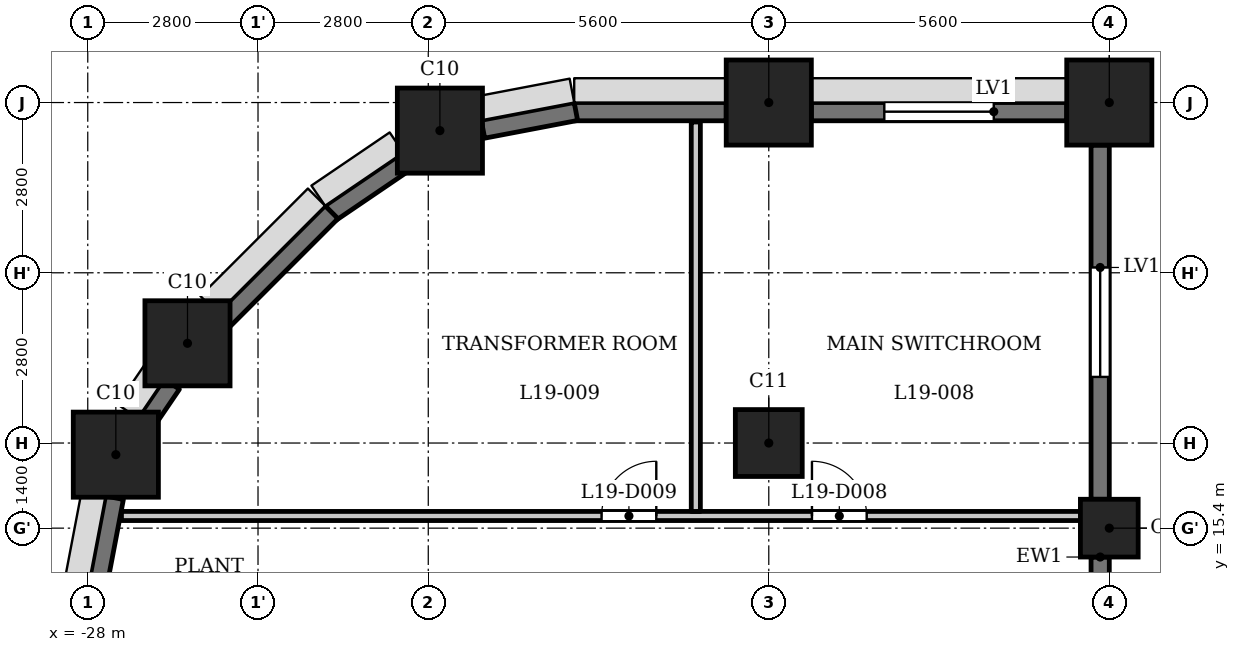
"""IFC4 building model, lengths in metres.
Left out: names, types, materials, properties, quantities, classifications, styles, units other than length and angle.
Written with IfcOpenShell. Run it as: python <this file> out.ifc"""

import sys

from ifc_helpers import new_model, si_unit, direction, frame, frame_2d, origin, origin_2d, place, context, subcontext, project, spatial, rectangle, extrude, element, fill, save


model = new_model("IFC4")
c1 = context("Model", 3, precision=1e-05, world=origin(), true_north=direction((0.0, 1.0)))
c2 = subcontext(c1, "Body", "Model", "MODEL_VIEW")
j1 = project(units=[si_unit("LENGTHUNIT", "METRE"), si_unit("PLANEANGLEUNIT", "RADIAN")], contexts=[c1])
p1 = place(None, origin())
s1 = spatial("IfcSite", under=j1, at=p1, CompositionType="ELEMENT")
p2 = place(p1, origin())
s2 = spatial("IfcBuilding", under=s1, at=p2, CompositionType="ELEMENT")
p3 = place(p2, frame((0.0, 0.0, 77.9)))
s3 = spatial("IfcBuildingStorey", under=s2, at=p3, CompositionType="ELEMENT", Elevation=77.9)
for number, where, z_axis, x_axis in (
    (1, (-11.2, 22.4, 0.0), (0.0, 0.0, 1.0), (1.0, 0.0, 0.0)),
    (2, (-16.8, 22.4, 0.0), (0.0, 0.0, 1.0), (1.0, 0.0, 0.0)),
    (3, (-22.209, 21.938, 0.0), (0.0, 0.0, 1.0), (1.0, 0.0, 0.0)),
    (4, (-26.36, 18.44, 0.0), (0.0, 0.0, 1.0), (1.0, 0.0, 0.0)),
    (5, (-27.538, 16.609, 0.0), (0.0, 0.0, 1.0), (1.0, 0.0, 0.0)),
):
    element("IfcColumn", number, at=place(p3, frame(where, z_axis=z_axis, x_axis=x_axis)), inside=s3, PredefinedType="COLUMN", context=c2, shape_type="SweptSolid", body=[
        extrude(rectangle(XDim=1.4, YDim=1.4, at=origin_2d()), origin(), (0.0, 0.0, 1.0), 5.4),
    ])
p4 = place(p3, frame((-16.8, 16.8, 0.0), z_axis=(0.0, 0.0, 1.0), x_axis=(1.0, 0.0, 0.0)))
e6 = element("IfcColumn", 6, at=p4, inside=s3, PredefinedType="COLUMN", context=c2, shape_type="SweptSolid", body=[
    extrude(rectangle(XDim=1.1, YDim=1.1, at=origin_2d()), origin(), (0.0, 0.0, 1.0), 5.4),
])
p5 = place(p3, frame((-11.2, 15.4, 0.0), z_axis=(0.0, 0.0, 1.0), x_axis=(1.0, 0.0, 0.0)))
e7 = element("IfcColumn", 7, at=p5, inside=s3, PredefinedType="COLUMN", context=c2, shape_type="SweptSolid", body=[
    extrude(rectangle(XDim=0.95, YDim=0.95, at=origin_2d()), origin(), (0.0, 0.0, 1.0), 5.4),
])
p6 = place(p3, frame((-11.35, 8.95, 0.0), z_axis=(0.0, 0.0, 1.0), x_axis=(0.0, 1.0, 0.0)))
e8 = element("IfcWall", 8, at=p6, inside=s3, PredefinedType="SOLIDWALL", context=c2, shape_type="SweptSolid", body=[
    extrude(rectangle(XDim=5.975, YDim=0.3, at=frame_2d((2.988, 0.0))), origin(), (0.0, 0.0, 1.0), 5.1),
])
p7 = place(p6, frame((1.188, 0.0, 0.9)))
e9 = element("IfcOpeningElement", 9, at=p7, cuts=e8, PredefinedType="OPENING", context=c2, shape_type="SweptSolid", body=[
    extrude(rectangle(XDim=1.8, YDim=1.5, at=frame_2d((0.9, 0.75))), frame((0.0, 0.16, 0.0), z_axis=(0.0, -1.0, 0.0), x_axis=(1.0, 0.0, 0.0)), (0.0, 0.0, 1.0), 0.32),
])
p8 = place(p3, frame((-11.35, 15.875, 0.0), z_axis=(0.0, 0.0, 1.0), x_axis=(0.0, 1.0, 0.0)))
e10 = element("IfcWall", 10, at=p8, inside=s3, PredefinedType="SOLIDWALL", context=c2, shape_type="SweptSolid", body=[
    extrude(rectangle(XDim=5.825, YDim=0.3, at=frame_2d((2.913, 0.0))), origin(), (0.0, 0.0, 1.0), 5.1),
])
p9 = place(p8, frame((2.012, 0.0, 0.9)))
e11 = element("IfcOpeningElement", 11, at=p9, cuts=e10, PredefinedType="OPENING", context=c2, shape_type="SweptSolid", body=[
    extrude(rectangle(XDim=1.8, YDim=1.5, at=frame_2d((0.9, 0.75))), frame((0.0, 0.16, 0.0), z_axis=(0.0, -1.0, 0.0), x_axis=(1.0, 0.0, 0.0)), (0.0, 0.0, 1.0), 0.32),
])
p10 = place(p3, frame((-11.9, 22.25, 0.0), z_axis=(0.0, 0.0, 1.0), x_axis=(-1.0, 0.0, 0.0)))
e12 = element("IfcWall", 12, at=p10, inside=s3, PredefinedType="SOLIDWALL", context=c2, shape_type="SweptSolid", body=[
    extrude(rectangle(XDim=4.2, YDim=0.3, at=frame_2d((2.1, 0.0))), origin(), (0.0, 0.0, 1.0), 4.25),
])
p11 = place(p10, frame((1.2, 0.0, 0.9)))
e13 = element("IfcOpeningElement", 13, at=p11, cuts=e12, PredefinedType="OPENING", context=c2, shape_type="SweptSolid", body=[
    extrude(rectangle(XDim=1.8, YDim=1.5, at=frame_2d((0.9, 0.75))), frame((0.0, 0.16, 0.0), z_axis=(0.0, -1.0, 0.0), x_axis=(1.0, 0.0, 0.0)), (0.0, 0.0, 1.0), 0.32),
])
p12 = place(p3, frame((-17.5, 22.25, 0.0), z_axis=(0.0, 0.0, 1.0), x_axis=(-1.0, 0.0, 0.0)))
e14 = element("IfcWall", 14, at=p12, inside=s3, PredefinedType="SOLIDWALL", context=c2, shape_type="SweptSolid", body=[
    extrude(rectangle(XDim=2.5, YDim=0.3, at=frame_2d((1.25, 0.0))), origin(), (0.0, 0.0, 1.0), 4.25),
])
p13 = place(p3, frame((-19.972, 22.253, 0.0), z_axis=(0.0, 0.0, 1.0), x_axis=(-0.982297345734, -0.187328386968, 0.0)))
e15 = element("IfcWall", 15, at=p13, inside=s3, PredefinedType="SOLIDWALL", context=c2, shape_type="SweptSolid", body=[
    extrude(rectangle(XDim=1.556, YDim=0.3, at=frame_2d((0.778, 0.0))), origin(), (0.0, 0.0, 1.0), 4.25),
])
p14 = place(p3, frame((-22.726, 21.454, 0.0), z_axis=(0.0, 0.0, 1.0), x_axis=(-0.827019875346, -0.562172683241, 0.0)))
e16 = element("IfcWall", 16, at=p14, inside=s3, PredefinedType="SOLIDWALL", context=c2, shape_type="SweptSolid", body=[
    extrude(rectangle(XDim=1.556, YDim=0.3, at=frame_2d((0.778, 0.0))), origin(), (0.0, 0.0, 1.0), 4.25),
])
p15 = place(p3, frame((-23.991, 20.597, 0.0), z_axis=(0.0, 0.0, 1.0), x_axis=(-0.707106781187, -0.707106781187, 0.0)))
e17 = element("IfcWall", 17, at=p15, inside=s3, PredefinedType="SOLIDWALL", context=c2, shape_type="SweptSolid", body=[
    extrude(rectangle(XDim=2.5, YDim=0.3, at=frame_2d((1.25, 0.0))), origin(), (0.0, 0.0, 1.0), 4.25),
])
p16 = place(p3, frame((-26.617, 17.769, 0.0), z_axis=(0.0, 0.0, 1.0), x_axis=(-0.562000651531, -0.827136788977, 0.0)))
e18 = element("IfcWall", 18, at=p16, inside=s3, PredefinedType="SOLIDWALL", context=c2, shape_type="SweptSolid", body=[
    extrude(rectangle(XDim=0.777, YDim=0.3, at=frame_2d((0.389, 0.0))), origin(), (0.0, 0.0, 1.0), 5.1),
])
p17 = place(p3, frame((-27.561, 15.9, 0.0), z_axis=(0.0, 0.0, 1.0), x_axis=(-0.187328386968, -0.982297345734, 0.0)))
e19 = element("IfcWall", 19, at=p17, inside=s3, PredefinedType="SOLIDWALL", context=c2, shape_type="SweptSolid", body=[
    extrude(rectangle(XDim=1.556, YDim=0.3, at=frame_2d((0.778, 0.0))), origin(), (0.0, 0.0, 1.0), 4.25),
])
p18 = place(p3, frame((-27.446, 15.6, 0.0), z_axis=(0.0, 0.0, 1.0), x_axis=(1.0, 0.0, 0.0)))
e20 = element("IfcWall", 20, at=p18, inside=s3, PredefinedType="PARTITIONING", context=c2, shape_type="SweptSolid", body=[
    extrude(rectangle(XDim=16.156, YDim=0.15, at=frame_2d((8.078, 0.0))), origin(), (0.0, 0.0, 1.0), 5.1),
])
p19 = place(p18, frame((11.356, 0.0, 0.0)))
e21 = element("IfcOpeningElement", 21, at=p19, cuts=e20, PredefinedType="OPENING", context=c2, shape_type="SweptSolid", body=[
    extrude(rectangle(XDim=0.9, YDim=2.1, at=frame_2d((0.45, 1.05))), frame((0.0, 0.085, 0.0), z_axis=(0.0, -1.0, 0.0), x_axis=(1.0, 0.0, 0.0)), (0.0, 0.0, 1.0), 0.17),
])
p20 = place(p18, frame((7.896, 0.0, 0.0)))
e22 = element("IfcOpeningElement", 22, at=p20, cuts=e20, PredefinedType="OPENING", context=c2, shape_type="SweptSolid", body=[
    extrude(rectangle(XDim=0.9, YDim=2.1, at=frame_2d((0.45, 1.05))), frame((0.0, 0.085, 0.0), z_axis=(0.0, -1.0, 0.0), x_axis=(1.0, 0.0, 0.0)), (0.0, 0.0, 1.0), 0.17),
])
p21 = place(p3, frame((-18.0, 15.675, 0.0), z_axis=(0.0, 0.0, 1.0), x_axis=(0.0, 1.0, 0.0)))
e23 = element("IfcWall", 23, at=p21, inside=s3, PredefinedType="PARTITIONING", context=c2, shape_type="SweptSolid", body=[
    extrude(rectangle(XDim=6.405, YDim=0.15, at=frame_2d((3.203, 0.0))), origin(), (0.0, 0.0, 1.0), 5.1),
])
p22 = place(p19, origin())
e24 = element("IfcDoor", 24, at=p22, inside=s3, OperationType="SINGLE_SWING_RIGHT", PredefinedType="DOOR", context=c2, shape_type="SweptSolid", body=[
    extrude(rectangle(XDim=0.9, YDim=2.1, at=frame_2d((0.45, 1.05))), frame((0.0, 0.025, 0.0), z_axis=(0.0, -1.0, 0.0), x_axis=(1.0, 0.0, 0.0)), (0.0, 0.0, 1.0), 0.05),
])
fill(e21, e24)
p23 = place(p20, origin())
e25 = element("IfcDoor", 25, at=p23, inside=s3, OperationType="SINGLE_SWING_LEFT", PredefinedType="DOOR", context=c2, shape_type="SweptSolid", body=[
    extrude(rectangle(XDim=0.9, YDim=2.1, at=frame_2d((0.45, 1.05))), frame((0.0, 0.025, 0.0), z_axis=(0.0, -1.0, 0.0), x_axis=(1.0, 0.0, 0.0)), (0.0, 0.0, 1.0), 0.05),
])
fill(e22, e25)
p24 = place(p9, origin())
e26 = element("IfcWindow", 26, at=p24, inside=s3, PartitioningType="SINGLE_PANEL", PredefinedType="WINDOW", context=c2, shape_type="SweptSolid", body=[
    extrude(rectangle(XDim=1.8, YDim=1.5, at=frame_2d((0.9, 0.75))), frame((0.0, 0.03, 0.0), z_axis=(0.0, -1.0, 0.0), x_axis=(1.0, 0.0, 0.0)), (0.0, 0.0, 1.0), 0.06),
])
fill(e11, e26)
p25 = place(p11, origin())
e27 = element("IfcWindow", 27, at=p25, inside=s3, PartitioningType="SINGLE_PANEL", PredefinedType="WINDOW", context=c2, shape_type="SweptSolid", body=[
    extrude(rectangle(XDim=1.8, YDim=1.5, at=frame_2d((0.9, 0.75))), frame((0.0, 0.03, 0.0), z_axis=(0.0, -1.0, 0.0), x_axis=(1.0, 0.0, 0.0)), (0.0, 0.0, 1.0), 0.06),
])
fill(e13, e27)
save(model, sys.argv[1])
